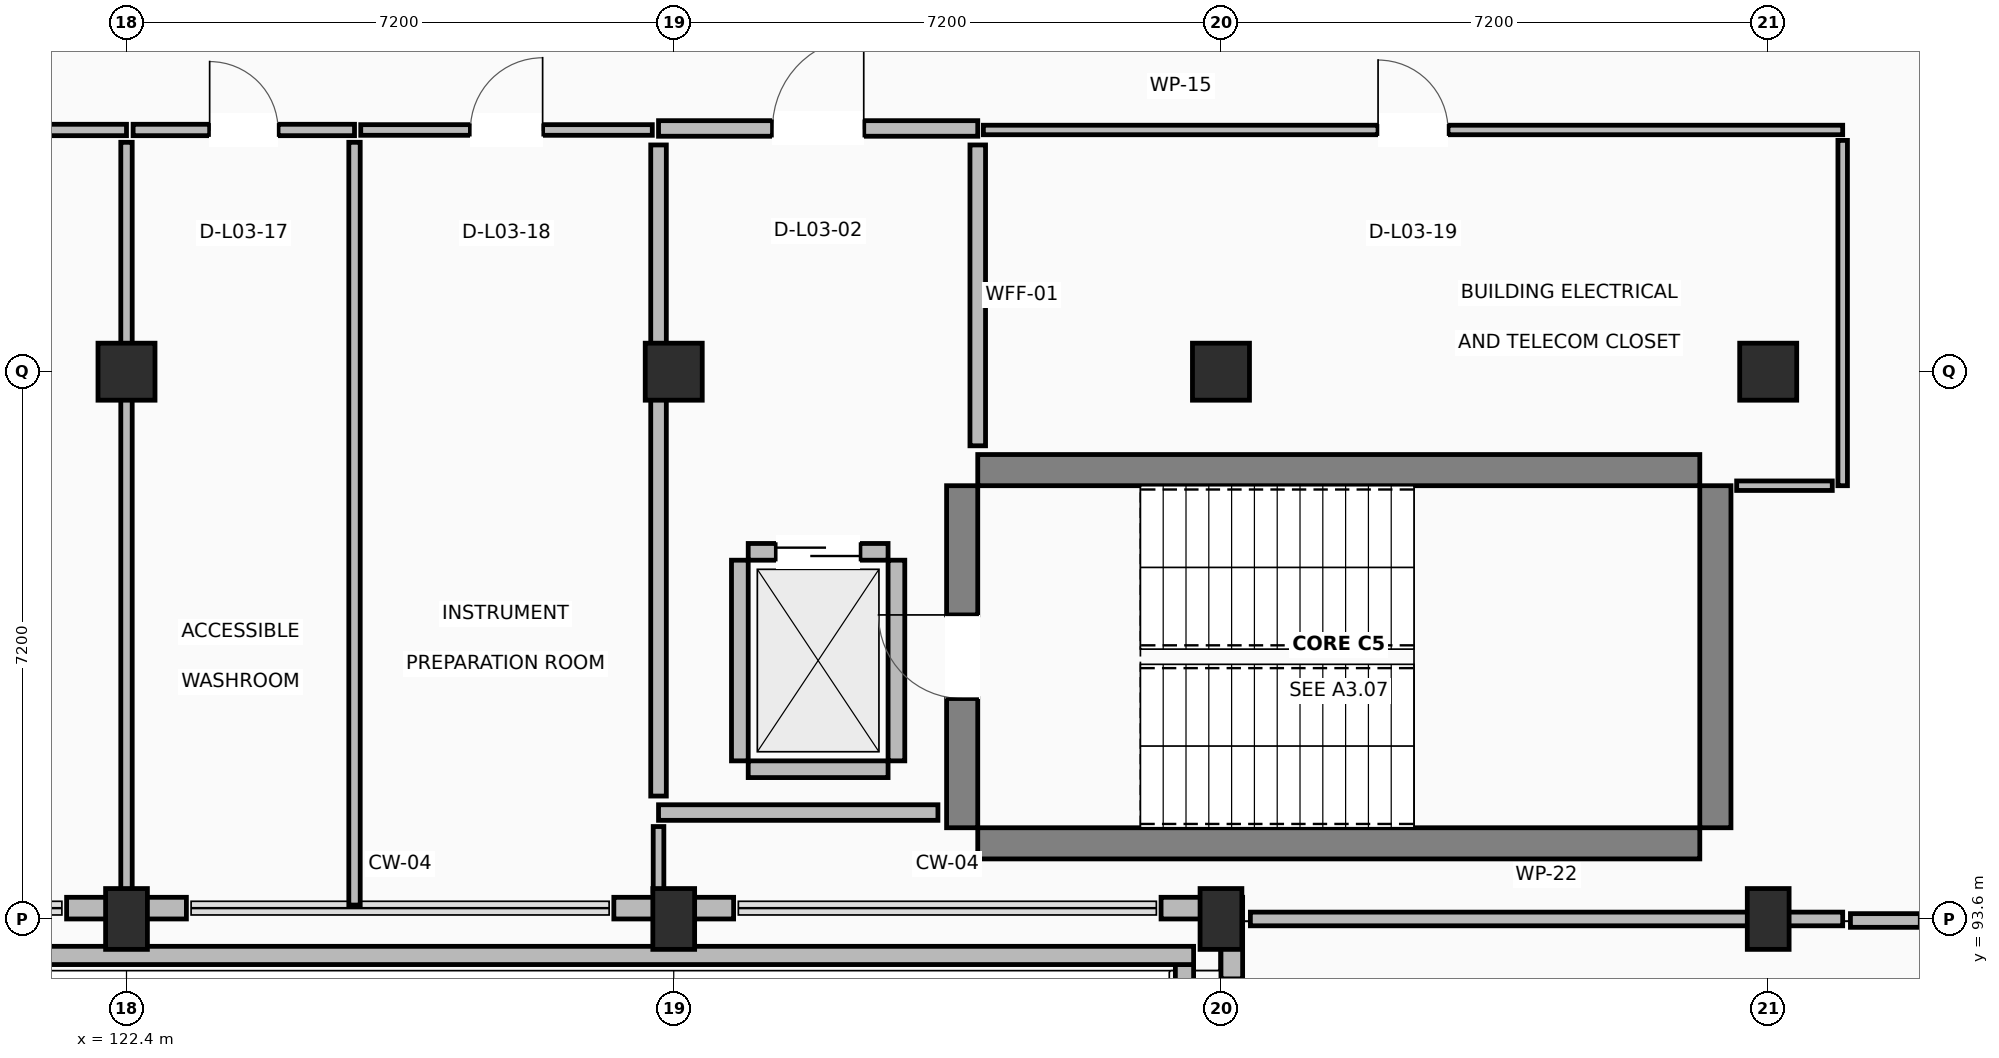
"""IFC4 building model, lengths in metres.
Left out: names, types, materials, properties, quantities, classifications, styles, units other than length and angle.
Written with IfcOpenShell. Run it as: python <this file> out.ifc"""

import sys

from ifc_helpers import new_model, si_unit, direction, frame, frame_2d, origin, origin_2d, place, context, subcontext, project, spatial, rectangle, extrude, element, fill, save


model = new_model("IFC4")
c1 = context("Model", 3, precision=1e-05, world=origin(), true_north=direction((0.0, 1.0)))
c2 = subcontext(c1, "Body", "Model", "MODEL_VIEW")
j1 = project(units=[si_unit("LENGTHUNIT", "METRE"), si_unit("PLANEANGLEUNIT", "RADIAN")], contexts=[c1])
p1 = place(None, origin())
s1 = spatial("IfcSite", under=j1, at=p1, CompositionType="ELEMENT")
p2 = place(p1, origin())
s2 = spatial("IfcBuilding", under=s1, at=p2, CompositionType="ELEMENT")
p3 = place(p2, frame((0.0, 0.0, 13.5)))
s3 = spatial("IfcBuildingStorey", under=s2, at=p3, CompositionType="ELEMENT", Elevation=13.5)
p4 = place(p3, frame((122.4, 93.6, 0.0), z_axis=(0.0, 0.0, 1.0), x_axis=(1.0, 0.0, 0.0)))
e1 = element("IfcColumn", 1, at=p4, inside=s3, PredefinedType="COLUMN", context=c2, shape_type="SweptSolid", body=[
    extrude(rectangle(XDim=0.55, YDim=0.8, at=origin_2d()), origin(), (0.0, 0.0, 1.0), 4.22),
])
p5 = place(p3, frame((122.4, 100.8, 0.0), z_axis=(0.0, 0.0, 1.0), x_axis=(1.0, 0.0, 0.0)))
e2 = element("IfcColumn", 2, at=p5, inside=s3, PredefinedType="COLUMN", context=c2, shape_type="SweptSolid", body=[
    extrude(rectangle(XDim=0.75, YDim=0.75, at=origin_2d()), origin(), (0.0, 0.0, 1.0), 4.22),
])
p6 = place(p3, frame((129.6, 93.6, 0.0), z_axis=(0.0, 0.0, 1.0), x_axis=(1.0, 0.0, 0.0)))
e3 = element("IfcColumn", 3, at=p6, inside=s3, PredefinedType="COLUMN", context=c2, shape_type="SweptSolid", body=[
    extrude(rectangle(XDim=0.55, YDim=0.8, at=origin_2d()), origin(), (0.0, 0.0, 1.0), 4.22),
])
p7 = place(p3, frame((129.6, 100.8, 0.0), z_axis=(0.0, 0.0, 1.0), x_axis=(1.0, 0.0, 0.0)))
e4 = element("IfcColumn", 4, at=p7, inside=s3, PredefinedType="COLUMN", context=c2, shape_type="SweptSolid", body=[
    extrude(rectangle(XDim=0.75, YDim=0.75, at=origin_2d()), origin(), (0.0, 0.0, 1.0), 4.22),
])
p8 = place(p3, frame((136.8, 93.6, 0.0), z_axis=(0.0, 0.0, 1.0), x_axis=(1.0, 0.0, 0.0)))
e5 = element("IfcColumn", 5, at=p8, inside=s3, PredefinedType="COLUMN", context=c2, shape_type="SweptSolid", body=[
    extrude(rectangle(XDim=0.55, YDim=0.8, at=origin_2d()), origin(), (0.0, 0.0, 1.0), 4.22),
])
p9 = place(p3, frame((136.8, 100.8, 0.0), z_axis=(0.0, 0.0, 1.0), x_axis=(1.0, 0.0, 0.0)))
e6 = element("IfcColumn", 6, at=p9, inside=s3, PredefinedType="COLUMN", context=c2, shape_type="SweptSolid", body=[
    extrude(rectangle(XDim=0.75, YDim=0.75, at=origin_2d()), origin(), (0.0, 0.0, 1.0), 4.22),
])
p10 = place(p3, frame((144.0, 93.6, 0.0), z_axis=(0.0, 0.0, 1.0), x_axis=(1.0, 0.0, 0.0)))
e7 = element("IfcColumn", 7, at=p10, inside=s3, PredefinedType="COLUMN", context=c2, shape_type="SweptSolid", body=[
    extrude(rectangle(XDim=0.55, YDim=0.8, at=origin_2d()), origin(), (0.0, 0.0, 1.0), 4.22),
])
p11 = place(p3, frame((144.0, 100.8, 0.0), z_axis=(0.0, 0.0, 1.0), x_axis=(1.0, 0.0, 0.0)))
e8 = element("IfcColumn", 8, at=p11, inside=s3, PredefinedType="COLUMN", context=c2, shape_type="SweptSolid", body=[
    extrude(rectangle(XDim=0.75, YDim=0.75, at=origin_2d()), origin(), (0.0, 0.0, 1.0), 4.22),
])
for number, where, z_axis, x_axis in (
    (9, (133.6, 94.595, 0.0), (0.0, 0.0, 1.0), (1.0, 0.0, 0.0)),
    (10, (133.6, 99.505, 0.0), (0.0, 0.0, 1.0), (1.0, 0.0, 0.0)),
):
    element("IfcWall", number, at=place(p3, frame(where, z_axis=z_axis, x_axis=x_axis)), inside=s3, PredefinedType="SHEAR", context=c2, shape_type="SweptSolid", body=[
        extrude(rectangle(XDim=9.5, YDim=0.41, at=frame_2d((4.75, 0.0))), origin(), (0.0, 0.0, 1.0), 4.22),
    ])
p12 = place(p3, frame((133.395, 94.8, 0.0), z_axis=(0.0, 0.0, 1.0), x_axis=(0.0, 1.0, 0.0)))
e11 = element("IfcWall", 11, at=p12, inside=s3, PredefinedType="SHEAR", context=c2, shape_type="SweptSolid", body=[
    extrude(rectangle(XDim=4.5, YDim=0.41, at=frame_2d((2.25, 0.0))), origin(), (0.0, 0.0, 1.0), 4.22),
])
p13 = place(p12, frame((1.7, 0.0, 0.0)))
e12 = element("IfcOpeningElement", 12, at=p13, cuts=e11, PredefinedType="OPENING", context=c2, shape_type="SweptSolid", body=[
    extrude(rectangle(XDim=1.1, YDim=2.15, at=frame_2d((0.55, 1.075))), frame((0.0, 0.215, 0.0), z_axis=(0.0, -1.0, 0.0), x_axis=(1.0, 0.0, 0.0)), (0.0, 0.0, 1.0), 0.43),
])
p14 = place(p3, frame((143.305, 94.8, 0.0), z_axis=(0.0, 0.0, 1.0), x_axis=(0.0, 1.0, 0.0)))
e13 = element("IfcWall", 13, at=p14, inside=s3, PredefinedType="SHEAR", context=c2, shape_type="SweptSolid", body=[
    extrude(rectangle(XDim=4.5, YDim=0.41, at=frame_2d((2.25, 0.0))), origin(), (0.0, 0.0, 1.0), 4.22),
])
for number, where, z_axis, x_axis in (
    (14, (121.612, 93.742, 0.0), (0.0, 0.0, 1.0), (1.0, 0.0, 0.0)),
    (15, (128.812, 93.742, 0.0), (0.0, 0.0, 1.0), (1.0, 0.0, 0.0)),
):
    element("IfcWall", number, at=place(p3, frame(where, z_axis=z_axis, x_axis=x_axis)), inside=s3, PredefinedType="STANDARD", context=c2, shape_type="SweptSolid", body=[
        extrude(rectangle(XDim=1.576, YDim=0.285, at=frame_2d((0.788, 0.0))), origin(), (0.0, 0.0, 1.0), 3.26),
    ])
p15 = place(p3, frame((136.012, 93.742, 0.0), z_axis=(0.0, 0.0, 1.0), x_axis=(1.0, 0.0, 0.0)))
e16 = element("IfcWall", 16, at=p15, inside=s3, PredefinedType="STANDARD", context=c2, shape_type="SweptSolid", body=[
    extrude(rectangle(XDim=0.788, YDim=0.285, at=frame_2d((0.394, 0.0))), origin(), (0.0, 0.0, 1.0), 3.26),
])
p16 = place(p3, frame((136.942, 93.885, 0.0), z_axis=(0.0, 0.0, 1.0), x_axis=(0.0, -1.0, 0.0)))
e17 = element("IfcWall", 17, at=p16, inside=s3, PredefinedType="STANDARD", context=c2, shape_type="SweptSolid", body=[
    extrude(rectangle(XDim=1.073, YDim=0.285, at=frame_2d((0.537, 0.0))), origin(), (0.0, 0.0, 1.0), 3.26),
])
p17 = place(p3, frame((136.32, 86.04, 0.0), z_axis=(0.0, 0.0, 1.0), x_axis=(0.0, 1.0, 0.0)))
e18 = element("IfcWall", 18, at=p17, inside=s3, PredefinedType="PARAPET", context=c2, shape_type="SweptSolid", body=[
    extrude(rectangle(XDim=6.96, YDim=0.24, at=frame_2d((3.48, 0.0))), origin(), (0.0, 0.0, 1.0), 1.12),
])
p18 = place(p3, frame((136.44, 93.12, 0.0), z_axis=(0.0, 0.0, 1.0), x_axis=(-1.0, 0.0, 0.0)))
e19 = element("IfcWall", 19, at=p18, inside=s3, PredefinedType="PARAPET", context=c2, shape_type="SweptSolid", body=[
    extrude(rectangle(XDim=57.84, YDim=0.24, at=frame_2d((28.92, 0.0))), origin(), (0.0, 0.0, 1.0), 1.12),
])
p19 = place(p3, frame((130.58, 95.57, 0.0), z_axis=(0.0, 0.0, 1.0), x_axis=(1.0, 0.0, 0.0)))
e20 = element("IfcWall", 20, at=p19, inside=s3, PredefinedType="STANDARD", context=c2, shape_type="SweptSolid", body=[
    extrude(rectangle(XDim=1.84, YDim=0.22, at=frame_2d((0.92, 0.0))), origin(), (0.0, 0.0, 1.0), 3.26),
])
p20 = place(p3, frame((130.58, 98.43, 0.0), z_axis=(0.0, 0.0, 1.0), x_axis=(1.0, 0.0, 0.0)))
e21 = element("IfcWall", 21, at=p20, inside=s3, PredefinedType="STANDARD", context=c2, shape_type="SweptSolid", body=[
    extrude(rectangle(XDim=1.84, YDim=0.22, at=frame_2d((0.92, 0.0))), origin(), (0.0, 0.0, 1.0), 3.26),
])
p21 = place(p20, frame((0.37, 0.0, 0.0)))
e22 = element("IfcOpeningElement", 22, at=p21, cuts=e21, PredefinedType="OPENING", context=c2, shape_type="SweptSolid", body=[
    extrude(rectangle(XDim=1.1, YDim=2.15, at=frame_2d((0.55, 1.075))), frame((0.0, 0.12, 0.0), z_axis=(0.0, -1.0, 0.0), x_axis=(1.0, 0.0, 0.0)), (0.0, 0.0, 1.0), 0.24),
])
for number, where, z_axis, x_axis in (
    (23, (130.47, 95.68, 0.0), (0.0, 0.0, 1.0), (0.0, 1.0, 0.0)),
    (24, (132.53, 95.68, 0.0), (0.0, 0.0, 1.0), (0.0, 1.0, 0.0)),
):
    element("IfcWall", number, at=place(p3, frame(where, z_axis=z_axis, x_axis=x_axis)), inside=s3, PredefinedType="STANDARD", context=c2, shape_type="SweptSolid", body=[
        extrude(rectangle(XDim=2.64, YDim=0.22, at=frame_2d((1.32, 0.0))), origin(), (0.0, 0.0, 1.0), 3.26),
    ])
p22 = place(p3, frame((129.4, 104.0, 0.0), z_axis=(0.0, 0.0, 1.0), x_axis=(1.0, 0.0, 0.0)))
e25 = element("IfcWall", 25, at=p22, inside=s3, PredefinedType="PARTITIONING", context=c2, shape_type="SweptSolid", body=[
    extrude(rectangle(XDim=4.2, YDim=0.205, at=frame_2d((2.1, 0.0))), origin(), (0.0, 0.0, 1.0), 3.26),
])
p23 = place(p22, frame((1.5, 0.0, 0.0)))
e26 = element("IfcOpeningElement", 26, at=p23, cuts=e25, PredefinedType="OPENING", context=c2, shape_type="SweptSolid", body=[
    extrude(rectangle(XDim=1.2, YDim=2.15, at=frame_2d((0.6, 1.075))), frame((0.0, 0.113, 0.0), z_axis=(0.0, -1.0, 0.0), x_axis=(1.0, 0.0, 0.0)), (0.0, 0.0, 1.0), 0.225),
])
p24 = place(p3, frame((133.6, 103.783, 0.0), z_axis=(0.0, 0.0, 1.0), x_axis=(0.0, -1.0, 0.0)))
e27 = element("IfcWall", 27, at=p24, inside=s3, PredefinedType="PARTITIONING", context=c2, shape_type="SweptSolid", body=[
    extrude(rectangle(XDim=3.958, YDim=0.205, at=frame_2d((1.979, 0.0))), origin(), (0.0, 0.0, 1.0), 3.26),
])
p25 = place(p3, frame((133.076, 95.0, 0.0), z_axis=(0.0, 0.0, 1.0), x_axis=(-1.0, 0.0, 0.0)))
e28 = element("IfcWall", 28, at=p25, inside=s3, PredefinedType="PARTITIONING", context=c2, shape_type="SweptSolid", body=[
    extrude(rectangle(XDim=3.676, YDim=0.205, at=frame_2d((1.838, 0.0))), origin(), (0.0, 0.0, 1.0), 3.26),
])
p26 = place(p3, frame((129.4, 95.217, 0.0), z_axis=(0.0, 0.0, 1.0), x_axis=(0.0, 1.0, 0.0)))
e29 = element("IfcWall", 29, at=p26, inside=s3, PredefinedType="PARTITIONING", context=c2, shape_type="SweptSolid", body=[
    extrude(rectangle(XDim=8.566, YDim=0.205, at=frame_2d((4.283, 0.0))), origin(), (0.0, 0.0, 1.0), 3.26),
])
p27 = place(p3, frame((137.187, 93.6, 0.0), z_axis=(0.0, 0.0, 1.0), x_axis=(1.0, 0.0, 0.0)))
e30 = element("IfcWall", 30, at=p27, inside=s3, PredefinedType="PARTITIONING", context=c2, shape_type="SweptSolid", body=[
    extrude(rectangle(XDim=7.793, YDim=0.18, at=frame_2d((3.896, 0.0))), origin(), (0.0, 0.0, 1.0), 3.26),
])
p28 = place(p3, frame((145.082, 93.58, 0.0), z_axis=(0.0, 0.0, 1.0), x_axis=(1.0, 0.0, 0.0)))
e31 = element("IfcWall", 31, at=p28, inside=s3, PredefinedType="PARTITIONING", context=c2, shape_type="SweptSolid", body=[
    extrude(rectangle(XDim=2.918, YDim=0.18, at=frame_2d((1.459, 0.0))), origin(), (0.0, 0.0, 1.0), 3.26),
])
p29 = place(p28, frame((0.919, 0.0, 0.0)))
e32 = element("IfcOpeningElement", 32, at=p29, cuts=e31, PredefinedType="OPENING", context=c2, shape_type="SweptSolid", body=[
    extrude(rectangle(XDim=1.08, YDim=2.15, at=frame_2d((0.54, 1.075))), frame((0.0, 0.1, 0.0), z_axis=(0.0, -1.0, 0.0), x_axis=(1.0, 0.0, 0.0)), (0.0, 0.0, 1.0), 0.2),
])
p30 = place(p3, frame((115.362, 103.98, 0.0), z_axis=(0.0, 0.0, 1.0), x_axis=(1.0, 0.0, 0.0)))
e33 = element("IfcWall", 33, at=p30, inside=s3, PredefinedType="PARTITIONING", context=c2, shape_type="SweptSolid", body=[
    extrude(rectangle(XDim=7.038, YDim=0.15, at=frame_2d((3.519, 0.0))), origin(), (0.0, 0.0, 1.0), 3.26),
])
p31 = place(p30, frame((3.079, 0.0, 0.0)))
e34 = element("IfcOpeningElement", 34, at=p31, cuts=e33, PredefinedType="OPENING", context=c2, shape_type="SweptSolid", body=[
    extrude(rectangle(XDim=0.88, YDim=2.1, at=frame_2d((0.44, 1.05))), frame((0.0, 0.085, 0.0), z_axis=(0.0, -1.0, 0.0), x_axis=(1.0, 0.0, 0.0)), (0.0, 0.0, 1.0), 0.17),
])
p32 = place(p3, frame((122.4, 103.818, 0.0), z_axis=(0.0, 0.0, 1.0), x_axis=(0.0, -1.0, 0.0)))
e35 = element("IfcWall", 35, at=p32, inside=s3, PredefinedType="PARTITIONING", context=c2, shape_type="SweptSolid", body=[
    extrude(rectangle(XDim=9.846, YDim=0.15, at=frame_2d((4.923, 0.0))), origin(), (0.0, 0.0, 1.0), 3.26),
])
p33 = place(p3, frame((122.487, 103.98, 0.0), z_axis=(0.0, 0.0, 1.0), x_axis=(1.0, 0.0, 0.0)))
e36 = element("IfcWall", 36, at=p33, inside=s3, PredefinedType="PARTITIONING", context=c2, shape_type="SweptSolid", body=[
    extrude(rectangle(XDim=2.913, YDim=0.15, at=frame_2d((1.457, 0.0))), origin(), (0.0, 0.0, 1.0), 3.26),
])
p34 = place(p33, frame((1.007, 0.0, 0.0)))
e37 = element("IfcOpeningElement", 37, at=p34, cuts=e36, PredefinedType="OPENING", context=c2, shape_type="SweptSolid", body=[
    extrude(rectangle(XDim=0.9, YDim=2.1, at=frame_2d((0.45, 1.05))), frame((0.0, 0.085, 0.0), z_axis=(0.0, -1.0, 0.0), x_axis=(1.0, 0.0, 0.0)), (0.0, 0.0, 1.0), 0.17),
])
p35 = place(p3, frame((125.4, 103.818, 0.0), z_axis=(0.0, 0.0, 1.0), x_axis=(0.0, -1.0, 0.0)))
e38 = element("IfcWall", 38, at=p35, inside=s3, PredefinedType="PARTITIONING", context=c2, shape_type="SweptSolid", body=[
    extrude(rectangle(XDim=10.035, YDim=0.15, at=frame_2d((5.018, 0.0))), origin(), (0.0, 0.0, 1.0), 3.26),
])
p36 = place(p3, frame((125.482, 103.98, 0.0), z_axis=(0.0, 0.0, 1.0), x_axis=(1.0, 0.0, 0.0)))
e39 = element("IfcWall", 39, at=p36, inside=s3, PredefinedType="PARTITIONING", context=c2, shape_type="SweptSolid", body=[
    extrude(rectangle(XDim=3.836, YDim=0.14, at=frame_2d((1.918, 0.0))), origin(), (0.0, 0.0, 1.0), 3.26),
])
p37 = place(p36, frame((1.443, 0.0, 0.0)))
e40 = element("IfcOpeningElement", 40, at=p37, cuts=e39, PredefinedType="OPENING", context=c2, shape_type="SweptSolid", body=[
    extrude(rectangle(XDim=0.95, YDim=2.1, at=frame_2d((0.475, 1.05))), frame((0.0, 0.08, 0.0), z_axis=(0.0, -1.0, 0.0), x_axis=(1.0, 0.0, 0.0)), (0.0, 0.0, 1.0), 0.16),
])
p38 = place(p3, frame((129.4, 94.816, 0.0), z_axis=(0.0, 0.0, 1.0), x_axis=(0.0, -1.0, 0.0)))
e41 = element("IfcWall", 41, at=p38, inside=s3, PredefinedType="PARTITIONING", context=c2, shape_type="SweptSolid", body=[
    extrude(rectangle(XDim=0.849, YDim=0.14, at=frame_2d((0.424, 0.0))), origin(), (0.0, 0.0, 1.0), 3.26),
])
p39 = place(p3, frame((133.674, 103.98, 0.0), z_axis=(0.0, 0.0, 1.0), x_axis=(1.0, 0.0, 0.0)))
e42 = element("IfcWall", 42, at=p39, inside=s3, PredefinedType="PARTITIONING", context=c2, shape_type="SweptSolid", body=[
    extrude(rectangle(XDim=11.306, YDim=0.125, at=frame_2d((5.653, 0.0))), origin(), (0.0, 0.0, 1.0), 3.26),
])
p40 = place(p39, frame((5.193, 0.0, 0.0)))
e43 = element("IfcOpeningElement", 43, at=p40, cuts=e42, PredefinedType="OPENING", context=c2, shape_type="SweptSolid", body=[
    extrude(rectangle(XDim=0.92, YDim=2.1, at=frame_2d((0.46, 1.05))), frame((0.0, 0.073, 0.0), z_axis=(0.0, -1.0, 0.0), x_axis=(1.0, 0.0, 0.0)), (0.0, 0.0, 1.0), 0.145),
])
p41 = place(p3, frame((144.98, 103.843, 0.0), z_axis=(0.0, 0.0, 1.0), x_axis=(0.0, -1.0, 0.0)))
e44 = element("IfcWall", 44, at=p41, inside=s3, PredefinedType="PARTITIONING", context=c2, shape_type="SweptSolid", body=[
    extrude(rectangle(XDim=4.543, YDim=0.125, at=frame_2d((2.271, 0.0))), origin(), (0.0, 0.0, 1.0), 3.26),
])
p42 = place(p3, frame((144.843, 99.3, 0.0), z_axis=(0.0, 0.0, 1.0), x_axis=(-1.0, 0.0, 0.0)))
e45 = element("IfcWall", 45, at=p42, inside=s3, PredefinedType="PARTITIONING", context=c2, shape_type="SweptSolid", body=[
    extrude(rectangle(XDim=1.258, YDim=0.125, at=frame_2d((0.629, 0.0))), origin(), (0.0, 0.0, 1.0), 3.26),
])
p43 = place(p13, origin())
e46 = element("IfcDoor", 46, at=p43, inside=s3, OperationType="SINGLE_SWING_RIGHT", PredefinedType="DOOR", context=c2, shape_type="SweptSolid", body=[
    extrude(rectangle(XDim=1.1, YDim=2.15, at=frame_2d((0.55, 1.075))), frame((0.0, 0.025, 0.0), z_axis=(0.0, -1.0, 0.0), x_axis=(1.0, 0.0, 0.0)), (0.0, 0.0, 1.0), 0.05),
])
fill(e12, e46)
p44 = place(p21, origin())
e47 = element("IfcDoor", 47, at=p44, inside=s3, OperationType="SLIDING_TO_RIGHT", PredefinedType="DOOR", context=c2, shape_type="SweptSolid", body=[
    extrude(rectangle(XDim=1.1, YDim=2.15, at=frame_2d((0.55, 1.075))), frame((0.0, 0.025, 0.0), z_axis=(0.0, -1.0, 0.0), x_axis=(1.0, 0.0, 0.0)), (0.0, 0.0, 1.0), 0.05),
])
fill(e22, e47)
p45 = place(p23, origin())
e48 = element("IfcDoor", 48, at=p45, inside=s3, OperationType="SINGLE_SWING_RIGHT", PredefinedType="DOOR", context=c2, shape_type="SweptSolid", body=[
    extrude(rectangle(XDim=1.2, YDim=2.15, at=frame_2d((0.6, 1.075))), frame((0.0, 0.025, 0.0), z_axis=(0.0, -1.0, 0.0), x_axis=(1.0, 0.0, 0.0)), (0.0, 0.0, 1.0), 0.05),
])
fill(e26, e48)
p46 = place(p34, origin())
e49 = element("IfcDoor", 49, at=p46, inside=s3, OperationType="SINGLE_SWING_LEFT", PredefinedType="DOOR", context=c2, shape_type="SweptSolid", body=[
    extrude(rectangle(XDim=0.9, YDim=2.1, at=frame_2d((0.45, 1.05))), frame((0.0, 0.025, 0.0), z_axis=(0.0, -1.0, 0.0), x_axis=(1.0, 0.0, 0.0)), (0.0, 0.0, 1.0), 0.05),
])
fill(e37, e49)
p47 = place(p37, origin())
e50 = element("IfcDoor", 50, at=p47, inside=s3, OperationType="SINGLE_SWING_RIGHT", PredefinedType="DOOR", context=c2, shape_type="SweptSolid", body=[
    extrude(rectangle(XDim=0.95, YDim=2.1, at=frame_2d((0.475, 1.05))), frame((0.0, 0.025, 0.0), z_axis=(0.0, -1.0, 0.0), x_axis=(1.0, 0.0, 0.0)), (0.0, 0.0, 1.0), 0.05),
])
fill(e40, e50)
p48 = place(p40, origin())
e51 = element("IfcDoor", 51, at=p48, inside=s3, OperationType="SINGLE_SWING_LEFT", PredefinedType="DOOR", context=c2, shape_type="SweptSolid", body=[
    extrude(rectangle(XDim=0.92, YDim=2.1, at=frame_2d((0.46, 1.05))), frame((0.0, 0.025, 0.0), z_axis=(0.0, -1.0, 0.0), x_axis=(1.0, 0.0, 0.0)), (0.0, 0.0, 1.0), 0.05),
])
fill(e43, e51)
save(model, sys.argv[1])
